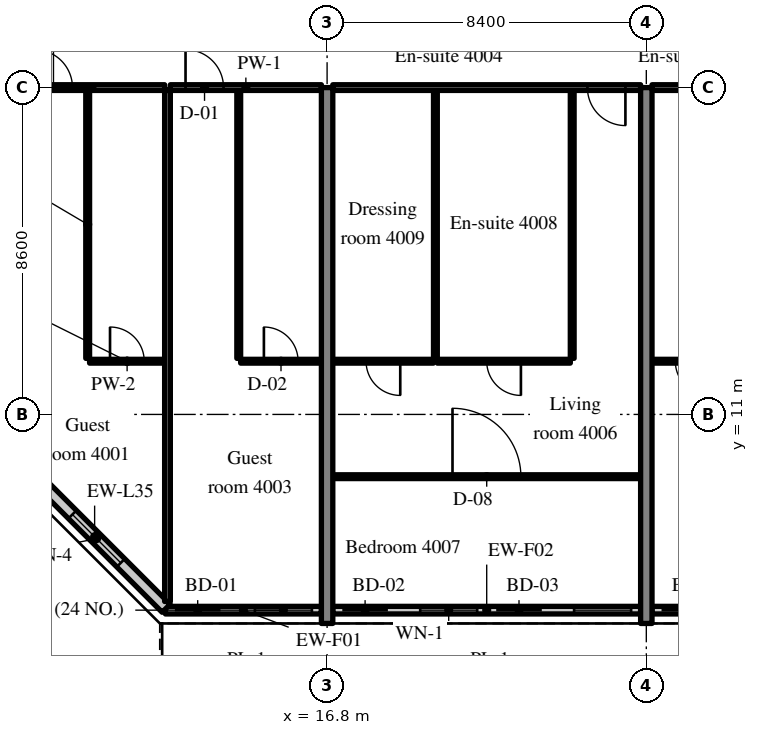
"""IFC4 building model, lengths in metres.
Left out: names, types, materials, properties, quantities, classifications, styles, units other than length and angle.
Written with IfcOpenShell. Run it as: python <this file> out.ifc"""

import sys

from ifc_helpers import new_model, si_unit, direction, frame, frame_2d, origin, place, context, subcontext, project, spatial, rectangle, extrude, source, transform, mapped, element, fill, save


model = new_model("IFC4")
c1 = context("Model", 3, precision=1e-05, world=origin(), true_north=direction((0.0, 1.0)))
c2 = subcontext(c1, "Body", "Model", "MODEL_VIEW")
j1 = project(units=[si_unit("LENGTHUNIT", "METRE"), si_unit("PLANEANGLEUNIT", "RADIAN")], contexts=[c1])
p1 = place(None, origin())
s1 = spatial("IfcSite", under=j1, at=p1, CompositionType="ELEMENT")
p2 = place(p1, origin())
s2 = spatial("IfcBuilding", under=s1, at=p2, CompositionType="ELEMENT")
p3 = place(p2, frame((0.0, 0.0, 166.8)))
s3 = spatial("IfcBuildingStorey", under=s2, at=p3, CompositionType="ELEMENT", Elevation=166.8)
m1 = source(origin(), c2, "Body", "SweptSolid", [
    extrude(rectangle(XDim=14.1, YDim=0.3, at=frame_2d((7.05, 0.0))), origin(), (0.0, 0.0, 1.0), 3.52),
])
for number, where, z_axis, x_axis in (
    (1, (16.8, 5.5, 0.0), (0.0, 0.0, 1.0), (0.0, 1.0, 0.0)),
    (2, (25.2, 5.5, 0.0), (0.0, 0.0, 1.0), (0.0, 1.0, 0.0)),
):
    element("IfcWall", number, at=place(p3, frame(where, z_axis=z_axis, x_axis=x_axis)), inside=s3, PredefinedType="SHEAR", context=c2, shape_type="MappedRepresentation", body=[
        mapped(m1, transform((0.0, 0.0, 0.0), scale=1.0)),
    ])
m2 = source(origin(), c2, "Body", "SweptSolid", [
    extrude(rectangle(XDim=4.105, YDim=0.2, at=frame_2d((2.052, 0.0))), origin(), (0.0, 0.0, 1.0), 2.87),
])
p4 = place(p3, frame((12.545, 5.85, 0.0), z_axis=(0.0, 0.0, 1.0), x_axis=(1.0, 0.0, 0.0)))
e3 = element("IfcWall", 3, at=p4, inside=s3, PredefinedType="SOLIDWALL", context=c2, shape_type="MappedRepresentation", body=[
    mapped(m2, transform((0.0, 0.0, 0.0), scale=1.0)),
])
m3 = source(origin(), c2, "Body", "SweptSolid", [
    extrude(rectangle(XDim=1.2, YDim=2.4, at=frame_2d((0.6, 1.2))), frame((0.0, 0.11, 0.0), z_axis=(0.0, -1.0, 0.0), x_axis=(1.0, 0.0, 0.0)), (0.0, 0.0, 1.0), 0.22),
])
p5 = place(p4, frame((0.25, 0.0, 0.0)))
e4 = element("IfcOpeningElement", 4, at=p5, cuts=e3, PredefinedType="OPENING", context=c2, shape_type="MappedRepresentation", body=[
    mapped(m3, transform((0.0, 0.0, 0.0), scale=1.0)),
])
m4 = source(origin(), c2, "Body", "SweptSolid", [
    extrude(rectangle(XDim=1.5, YDim=1.5, at=frame_2d((0.75, 0.75))), frame((0.0, 0.11, 0.0), z_axis=(0.0, -1.0, 0.0), x_axis=(1.0, 0.0, 0.0)), (0.0, 0.0, 1.0), 0.22),
])
p6 = place(p4, frame((2.355, 0.0, 0.9)))
e5 = element("IfcOpeningElement", 5, at=p6, cuts=e3, PredefinedType="OPENING", context=c2, shape_type="MappedRepresentation", body=[
    mapped(m4, transform((0.0, 0.0, 0.0), scale=1.0)),
])
m5 = source(origin(), c2, "Body", "SweptSolid", [
    extrude(rectangle(XDim=8.1, YDim=0.2, at=frame_2d((4.05, 0.0))), origin(), (0.0, 0.0, 1.0), 2.87),
])
p7 = place(p3, frame((16.95, 5.85, 0.0), z_axis=(0.0, 0.0, 1.0), x_axis=(1.0, 0.0, 0.0)))
e6 = element("IfcWall", 6, at=p7, inside=s3, PredefinedType="SOLIDWALL", context=c2, shape_type="MappedRepresentation", body=[
    mapped(m5, transform((0.0, 0.0, 0.0), scale=1.0)),
])
p8 = place(p7, frame((0.25, 0.0, 0.0)))
e7 = element("IfcOpeningElement", 7, at=p8, cuts=e6, PredefinedType="OPENING", context=c2, shape_type="MappedRepresentation", body=[
    mapped(m3, transform((0.0, 0.0, 0.0), scale=1.0)),
])
p9 = place(p7, frame((2.3, 0.0, 0.9)))
e8 = element("IfcOpeningElement", 8, at=p9, cuts=e6, PredefinedType="OPENING", context=c2, shape_type="MappedRepresentation", body=[
    mapped(m4, transform((0.0, 0.0, 0.0), scale=1.0)),
])
p10 = place(p7, frame((4.3, 0.0, 0.0)))
e9 = element("IfcOpeningElement", 9, at=p10, cuts=e6, PredefinedType="OPENING", context=c2, shape_type="MappedRepresentation", body=[
    mapped(m3, transform((0.0, 0.0, 0.0), scale=1.0)),
])
p11 = place(p7, frame((6.35, 0.0, 0.9)))
e10 = element("IfcOpeningElement", 10, at=p11, cuts=e6, PredefinedType="OPENING", context=c2, shape_type="MappedRepresentation", body=[
    mapped(m4, transform((0.0, 0.0, 0.0), scale=1.0)),
])
m6 = source(origin(), c2, "Body", "SweptSolid", [
    extrude(rectangle(XDim=8.1, YDim=0.2, at=frame_2d((4.05, 0.0))), origin(), (0.0, 0.0, 1.0), 2.87),
])
p12 = place(p3, frame((25.35, 5.85, 0.0), z_axis=(0.0, 0.0, 1.0), x_axis=(1.0, 0.0, 0.0)))
e11 = element("IfcWall", 11, at=p12, inside=s3, PredefinedType="SOLIDWALL", context=c2, shape_type="MappedRepresentation", body=[
    mapped(m6, transform((0.0, 0.0, 0.0), scale=1.0)),
])
p13 = place(p12, frame((0.25, 0.0, 0.0)))
e12 = element("IfcOpeningElement", 12, at=p13, cuts=e11, PredefinedType="OPENING", context=c2, shape_type="MappedRepresentation", body=[
    mapped(m3, transform((0.0, 0.0, 0.0), scale=1.0)),
])
p14 = place(p12, frame((2.3, 0.0, 0.9)))
e13 = element("IfcOpeningElement", 13, at=p14, cuts=e11, PredefinedType="OPENING", context=c2, shape_type="MappedRepresentation", body=[
    mapped(m4, transform((0.0, 0.0, 0.0), scale=1.0)),
])
p15 = place(p12, frame((4.3, 0.0, 0.0)))
e14 = element("IfcOpeningElement", 14, at=p15, cuts=e11, PredefinedType="OPENING", context=c2, shape_type="MappedRepresentation", body=[
    mapped(m3, transform((0.0, 0.0, 0.0), scale=1.0)),
])
p16 = place(p12, frame((6.35, 0.0, 0.9)))
e15 = element("IfcOpeningElement", 15, at=p16, cuts=e11, PredefinedType="OPENING", context=c2, shape_type="MappedRepresentation", body=[
    mapped(m4, transform((0.0, 0.0, 0.0), scale=1.0)),
])
m7 = source(origin(), c2, "Body", "SweptSolid", [
    extrude(rectangle(XDim=5.326, YDim=0.3, at=frame_2d((2.663, 0.0))), origin(), (0.0, 0.0, 1.0), 3.52),
])
p17 = place(p3, frame((8.8, 9.666, 0.0), z_axis=(0.0, 0.0, 1.0), x_axis=(0.707083859269, -0.707129702361, 0.0)))
e16 = element("IfcWall", 16, at=p17, inside=s3, PredefinedType="SOLIDWALL", context=c2, shape_type="MappedRepresentation", body=[
    mapped(m7, transform((0.0, 0.0, 0.0), scale=1.0)),
])
m8 = source(origin(), c2, "Body", "SweptSolid", [
    extrude(rectangle(XDim=1.8, YDim=1.5, at=frame_2d((0.9, 0.75))), frame((0.0, 0.16, 0.0), z_axis=(0.0, -1.0, 0.0), x_axis=(1.0, 0.0, 0.0)), (0.0, 0.0, 1.0), 0.32),
])
p18 = place(p17, frame((1.836, 0.0, 0.9)))
e17 = element("IfcOpeningElement", 17, at=p18, cuts=e16, PredefinedType="OPENING", context=c2, shape_type="MappedRepresentation", body=[
    mapped(m8, transform((0.0, 0.0, 0.0), scale=1.0)),
])
m9 = source(origin(), c2, "Body", "SweptSolid", [
    extrude(rectangle(XDim=7.05, YDim=0.1, at=frame_2d((3.525, 0.0))), origin(), (0.0, 0.0, 1.0), 3.52),
])
p19 = place(p3, frame((10.5, 12.475, 0.0), z_axis=(0.0, 0.0, 1.0), x_axis=(0.0, 1.0, 0.0)))
e18 = element("IfcWall", 18, at=p19, inside=s3, PredefinedType="PARTITIONING", context=c2, shape_type="MappedRepresentation", body=[
    mapped(m9, transform((0.0, 0.0, 0.0), scale=1.0)),
])
m10 = source(origin(), c2, "Body", "SweptSolid", [
    extrude(rectangle(XDim=1.975, YDim=0.1, at=frame_2d((0.987, 0.0))), origin(), (0.0, 0.0, 1.0), 3.52),
])
p20 = place(p3, frame((10.55, 12.4, 0.0), z_axis=(0.0, 0.0, 1.0), x_axis=(1.0, 0.0, 0.0)))
e19 = element("IfcWall", 19, at=p20, inside=s3, PredefinedType="PARTITIONING", context=c2, shape_type="MappedRepresentation", body=[
    mapped(m10, transform((0.0, 0.0, 0.0), scale=1.0)),
])
m11 = source(origin(), c2, "Body", "SweptSolid", [
    extrude(rectangle(XDim=0.9, YDim=2.1, at=frame_2d((0.45, 1.05))), frame((0.0, 0.06, 0.0), z_axis=(0.0, -1.0, 0.0), x_axis=(1.0, 0.0, 0.0)), (0.0, 0.0, 1.0), 0.12),
])
p21 = place(p20, frame((0.538, 0.0, 0.0)))
e20 = element("IfcOpeningElement", 20, at=p21, cuts=e19, PredefinedType="OPENING", context=c2, shape_type="MappedRepresentation", body=[
    mapped(m11, transform((0.0, 0.0, 0.0), scale=1.0)),
])
m12 = source(origin(), c2, "Body", "SweptSolid", [
    extrude(rectangle(XDim=3.825, YDim=0.15, at=frame_2d((1.913, 0.0))), origin(), (0.0, 0.0, 1.0), 2.82),
])
p22 = place(p3, frame((8.7, 19.6, 0.0), z_axis=(0.0, 0.0, 1.0), x_axis=(1.0, 0.0, 0.0)))
e21 = element("IfcWall", 21, at=p22, inside=s3, PredefinedType="PARTITIONING", context=c2, shape_type="MappedRepresentation", body=[
    mapped(m12, transform((0.0, 0.0, 0.0), scale=1.0)),
])
m13 = source(origin(), c2, "Body", "SweptSolid", [
    extrude(rectangle(XDim=1.0, YDim=2.1, at=frame_2d((0.5, 1.05))), frame((0.0, 0.085, 0.0), z_axis=(0.0, -1.0, 0.0), x_axis=(1.0, 0.0, 0.0)), (0.0, 0.0, 1.0), 0.17),
])
p23 = place(p22, frame((0.4, 0.0, 0.0)))
e22 = element("IfcOpeningElement", 22, at=p23, cuts=e21, PredefinedType="OPENING", context=c2, shape_type="MappedRepresentation", body=[
    mapped(m13, transform((0.0, 0.0, 0.0), scale=1.0)),
])
p24 = place(p3, frame((14.475, 12.475, 0.0), z_axis=(0.0, 0.0, 1.0), x_axis=(0.0, 1.0, 0.0)))
e23 = element("IfcWall", 23, at=p24, inside=s3, PredefinedType="PARTITIONING", context=c2, shape_type="MappedRepresentation", body=[
    mapped(m9, transform((0.0, 0.0, 0.0), scale=1.0)),
])
m14 = source(origin(), c2, "Body", "SweptSolid", [
    extrude(rectangle(XDim=2.125, YDim=0.1, at=frame_2d((1.062, 0.0))), origin(), (0.0, 0.0, 1.0), 3.52),
])
p25 = place(p3, frame((14.525, 12.4, 0.0), z_axis=(0.0, 0.0, 1.0), x_axis=(1.0, 0.0, 0.0)))
e24 = element("IfcWall", 24, at=p25, inside=s3, PredefinedType="PARTITIONING", context=c2, shape_type="MappedRepresentation", body=[
    mapped(m14, transform((0.0, 0.0, 0.0), scale=1.0)),
])
p26 = place(p25, frame((0.612, 0.0, 0.0)))
e25 = element("IfcOpeningElement", 25, at=p26, cuts=e24, PredefinedType="OPENING", context=c2, shape_type="MappedRepresentation", body=[
    mapped(m11, transform((0.0, 0.0, 0.0), scale=1.0)),
])
m15 = source(origin(), c2, "Body", "SweptSolid", [
    extrude(rectangle(XDim=3.975, YDim=0.15, at=frame_2d((1.987, 0.0))), origin(), (0.0, 0.0, 1.0), 2.82),
])
p27 = place(p3, frame((12.675, 19.6, 0.0), z_axis=(0.0, 0.0, 1.0), x_axis=(1.0, 0.0, 0.0)))
e26 = element("IfcWall", 26, at=p27, inside=s3, PredefinedType="PARTITIONING", context=c2, shape_type="MappedRepresentation", body=[
    mapped(m15, transform((0.0, 0.0, 0.0), scale=1.0)),
])
p28 = place(p27, frame((0.4, 0.0, 0.0)))
e27 = element("IfcOpeningElement", 27, at=p28, cuts=e26, PredefinedType="OPENING", context=c2, shape_type="MappedRepresentation", body=[
    mapped(m13, transform((0.0, 0.0, 0.0), scale=1.0)),
])
m16 = source(origin(), c2, "Body", "SweptSolid", [
    extrude(rectangle(XDim=13.447, YDim=0.15, at=frame_2d((6.724, 0.0))), origin(), (0.0, 0.0, 1.0), 3.52),
])
p29 = place(p3, frame((12.6, 6.078, 0.0), z_axis=(0.0, 0.0, 1.0), x_axis=(0.0, 1.0, 0.0)))
e28 = element("IfcWall", 28, at=p29, inside=s3, PredefinedType="PARTITIONING", context=c2, shape_type="MappedRepresentation", body=[
    mapped(m16, transform((0.0, 0.0, 0.0), scale=1.0)),
])
for number, where, z_axis, x_axis in (
    (29, (23.25, 12.475, 0.0), (0.0, 0.0, 1.0), (0.0, 1.0, 0.0)),
    (30, (19.65, 12.475, 0.0), (0.0, 0.0, 1.0), (0.0, 1.0, 0.0)),
):
    element("IfcWall", number, at=place(p3, frame(where, z_axis=z_axis, x_axis=x_axis)), inside=s3, PredefinedType="PARTITIONING", context=c2, shape_type="MappedRepresentation", body=[
        mapped(m9, transform((0.0, 0.0, 0.0), scale=1.0)),
    ])
m17 = source(origin(), c2, "Body", "SweptSolid", [
    extrude(rectangle(XDim=3.5, YDim=0.1, at=frame_2d((1.75, 0.0))), origin(), (0.0, 0.0, 1.0), 3.52),
])
p30 = place(p3, frame((19.7, 12.4, 0.0), z_axis=(0.0, 0.0, 1.0), x_axis=(1.0, 0.0, 0.0)))
e31 = element("IfcWall", 31, at=p30, inside=s3, PredefinedType="PARTITIONING", context=c2, shape_type="MappedRepresentation", body=[
    mapped(m17, transform((0.0, 0.0, 0.0), scale=1.0)),
])
p31 = place(p30, frame((1.3, 0.0, 0.0)))
e32 = element("IfcOpeningElement", 32, at=p31, cuts=e31, PredefinedType="OPENING", context=c2, shape_type="MappedRepresentation", body=[
    mapped(m11, transform((0.0, 0.0, 0.0), scale=1.0)),
])
m18 = source(origin(), c2, "Body", "SweptSolid", [
    extrude(rectangle(XDim=2.65, YDim=0.1, at=frame_2d((1.325, 0.0))), origin(), (0.0, 0.0, 1.0), 3.52),
])
p32 = place(p3, frame((16.95, 12.4, 0.0), z_axis=(0.0, 0.0, 1.0), x_axis=(1.0, 0.0, 0.0)))
e33 = element("IfcWall", 33, at=p32, inside=s3, PredefinedType="PARTITIONING", context=c2, shape_type="MappedRepresentation", body=[
    mapped(m18, transform((0.0, 0.0, 0.0), scale=1.0)),
])
p33 = place(p32, frame((0.875, 0.0, 0.0)))
e34 = element("IfcOpeningElement", 34, at=p33, cuts=e33, PredefinedType="OPENING", context=c2, shape_type="MappedRepresentation", body=[
    mapped(m11, transform((0.0, 0.0, 0.0), scale=1.0)),
])
m19 = source(origin(), c2, "Body", "SweptSolid", [
    extrude(rectangle(XDim=8.1, YDim=0.1, at=frame_2d((4.05, 0.0))), origin(), (0.0, 0.0, 1.0), 3.52),
])
p34 = place(p3, frame((16.95, 9.362, 0.0), z_axis=(0.0, 0.0, 1.0), x_axis=(1.0, 0.0, 0.0)))
e35 = element("IfcWall", 35, at=p34, inside=s3, PredefinedType="PARTITIONING", context=c2, shape_type="MappedRepresentation", body=[
    mapped(m19, transform((0.0, 0.0, 0.0), scale=1.0)),
])
m20 = source(origin(), c2, "Body", "SweptSolid", [
    extrude(rectangle(XDim=1.8, YDim=2.1, at=frame_2d((0.9, 1.05))), frame((0.0, 0.06, 0.0), z_axis=(0.0, -1.0, 0.0), x_axis=(1.0, 0.0, 0.0)), (0.0, 0.0, 1.0), 0.12),
])
p35 = place(p34, frame((3.15, 0.0, 0.0)))
e36 = element("IfcOpeningElement", 36, at=p35, cuts=e35, PredefinedType="OPENING", context=c2, shape_type="MappedRepresentation", body=[
    mapped(m20, transform((0.0, 0.0, 0.0), scale=1.0)),
])
m21 = source(origin(), c2, "Body", "SweptSolid", [
    extrude(rectangle(XDim=8.1, YDim=0.15, at=frame_2d((4.05, 0.0))), origin(), (0.0, 0.0, 1.0), 2.82),
])
p36 = place(p3, frame((16.95, 19.6, 0.0), z_axis=(0.0, 0.0, 1.0), x_axis=(1.0, 0.0, 0.0)))
e37 = element("IfcWall", 37, at=p36, inside=s3, PredefinedType="PARTITIONING", context=c2, shape_type="MappedRepresentation", body=[
    mapped(m21, transform((0.0, 0.0, 0.0), scale=1.0)),
])
p37 = place(p36, frame((6.7, 0.0, 0.0)))
e38 = element("IfcOpeningElement", 38, at=p37, cuts=e37, PredefinedType="OPENING", context=c2, shape_type="MappedRepresentation", body=[
    mapped(m13, transform((0.0, 0.0, 0.0), scale=1.0)),
])
p38 = place(p3, frame((25.35, 12.4, 0.0), z_axis=(0.0, 0.0, 1.0), x_axis=(1.0, 0.0, 0.0)))
e39 = element("IfcWall", 39, at=p38, inside=s3, PredefinedType="PARTITIONING", context=c2, shape_type="MappedRepresentation", body=[
    mapped(m14, transform((0.0, 0.0, 0.0), scale=1.0)),
])
p39 = place(p38, frame((0.613, 0.0, 0.0)))
e40 = element("IfcOpeningElement", 40, at=p39, cuts=e39, PredefinedType="OPENING", context=c2, shape_type="MappedRepresentation", body=[
    mapped(m11, transform((0.0, 0.0, 0.0), scale=1.0)),
])
p40 = place(p3, frame((25.35, 19.6, 0.0), z_axis=(0.0, 0.0, 1.0), x_axis=(1.0, 0.0, 0.0)))
e41 = element("IfcWall", 41, at=p40, inside=s3, PredefinedType="PARTITIONING", context=c2, shape_type="MappedRepresentation", body=[
    mapped(m15, transform((0.0, 0.0, 0.0), scale=1.0)),
])
p41 = place(p40, frame((2.575, 0.0, 0.0)))
e42 = element("IfcOpeningElement", 42, at=p41, cuts=e41, PredefinedType="OPENING", context=c2, shape_type="MappedRepresentation", body=[
    mapped(m13, transform((0.0, 0.0, 0.0), scale=1.0)),
])
m22 = source(origin(), c2, "Body", "SweptSolid", [
    extrude(rectangle(XDim=1.2, YDim=2.4, at=frame_2d((0.6, 1.2))), frame((0.0, 0.025, 0.0), z_axis=(0.0, -1.0, 0.0), x_axis=(1.0, 0.0, 0.0)), (0.0, 0.0, 1.0), 0.05),
])
p42 = place(p5, origin())
e43 = element("IfcDoor", 43, at=p42, inside=s3, OperationType="SLIDING_TO_LEFT", PredefinedType="DOOR", context=c2, shape_type="MappedRepresentation", body=[
    mapped(m22, transform((0.0, 0.0, 0.0), scale=1.0)),
])
fill(e4, e43)
m23 = source(origin(), c2, "Body", "SweptSolid", [
    extrude(rectangle(XDim=1.5, YDim=1.5, at=frame_2d((0.75, 0.75))), frame((0.0, 0.03, 0.0), z_axis=(0.0, -1.0, 0.0), x_axis=(1.0, 0.0, 0.0)), (0.0, 0.0, 1.0), 0.06),
])
p43 = place(p6, origin())
e44 = element("IfcWindow", 44, at=p43, inside=s3, PartitioningType="SINGLE_PANEL", PredefinedType="WINDOW", context=c2, shape_type="MappedRepresentation", body=[
    mapped(m23, transform((0.0, 0.0, 0.0), scale=1.0)),
])
fill(e5, e44)
p44 = place(p8, origin())
e45 = element("IfcDoor", 45, at=p44, inside=s3, OperationType="SLIDING_TO_RIGHT", PredefinedType="DOOR", context=c2, shape_type="MappedRepresentation", body=[
    mapped(m22, transform((0.0, 0.0, 0.0), scale=1.0)),
])
fill(e7, e45)
p45 = place(p9, origin())
e46 = element("IfcWindow", 46, at=p45, inside=s3, PartitioningType="SINGLE_PANEL", PredefinedType="WINDOW", context=c2, shape_type="MappedRepresentation", body=[
    mapped(m23, transform((0.0, 0.0, 0.0), scale=1.0)),
])
fill(e8, e46)
p46 = place(p10, origin())
e47 = element("IfcDoor", 47, at=p46, inside=s3, OperationType="SLIDING_TO_LEFT", PredefinedType="DOOR", context=c2, shape_type="MappedRepresentation", body=[
    mapped(m22, transform((0.0, 0.0, 0.0), scale=1.0)),
])
fill(e9, e47)
p47 = place(p11, origin())
e48 = element("IfcWindow", 48, at=p47, inside=s3, PartitioningType="SINGLE_PANEL", PredefinedType="WINDOW", context=c2, shape_type="MappedRepresentation", body=[
    mapped(m23, transform((0.0, 0.0, 0.0), scale=1.0)),
])
fill(e10, e48)
p48 = place(p13, origin())
e49 = element("IfcDoor", 49, at=p48, inside=s3, OperationType="SLIDING_TO_RIGHT", PredefinedType="DOOR", context=c2, shape_type="MappedRepresentation", body=[
    mapped(m22, transform((0.0, 0.0, 0.0), scale=1.0)),
])
fill(e12, e49)
m24 = source(origin(), c2, "Body", "SweptSolid", [
    extrude(rectangle(XDim=1.8, YDim=1.5, at=frame_2d((0.9, 0.75))), frame((0.0, 0.03, 0.0), z_axis=(0.0, -1.0, 0.0), x_axis=(1.0, 0.0, 0.0)), (0.0, 0.0, 1.0), 0.06),
])
p49 = place(p18, origin())
e50 = element("IfcWindow", 50, at=p49, inside=s3, PartitioningType="SINGLE_PANEL", PredefinedType="WINDOW", context=c2, shape_type="MappedRepresentation", body=[
    mapped(m24, transform((0.0, 0.0, 0.0), scale=1.0)),
])
fill(e17, e50)
m25 = source(origin(), c2, "Body", "SweptSolid", [
    extrude(rectangle(XDim=0.9, YDim=2.1, at=frame_2d((0.45, 1.05))), frame((0.0, 0.025, 0.0), z_axis=(0.0, -1.0, 0.0), x_axis=(1.0, 0.0, 0.0)), (0.0, 0.0, 1.0), 0.05),
])
p50 = place(p21, origin())
e51 = element("IfcDoor", 51, at=p50, inside=s3, OperationType="SINGLE_SWING_LEFT", PredefinedType="DOOR", context=c2, shape_type="MappedRepresentation", body=[
    mapped(m25, transform((0.0, 0.0, 0.0), scale=1.0)),
])
fill(e20, e51)
m26 = source(origin(), c2, "Body", "SweptSolid", [
    extrude(rectangle(XDim=1.0, YDim=2.1, at=frame_2d((0.5, 1.05))), frame((0.0, 0.025, 0.0), z_axis=(0.0, -1.0, 0.0), x_axis=(1.0, 0.0, 0.0)), (0.0, 0.0, 1.0), 0.05),
])
p51 = place(p23, origin())
e52 = element("IfcDoor", 52, at=p51, inside=s3, OperationType="SINGLE_SWING_LEFT", PredefinedType="DOOR", context=c2, shape_type="MappedRepresentation", body=[
    mapped(m26, transform((0.0, 0.0, 0.0), scale=1.0)),
])
fill(e22, e52)
p52 = place(p26, origin())
e53 = element("IfcDoor", 53, at=p52, inside=s3, OperationType="SINGLE_SWING_LEFT", PredefinedType="DOOR", context=c2, shape_type="MappedRepresentation", body=[
    mapped(m25, transform((0.0, 0.0, 0.0), scale=1.0)),
])
fill(e25, e53)
p53 = place(p28, origin())
e54 = element("IfcDoor", 54, at=p53, inside=s3, OperationType="SINGLE_SWING_LEFT", PredefinedType="DOOR", context=c2, shape_type="MappedRepresentation", body=[
    mapped(m26, transform((0.0, 0.0, 0.0), scale=1.0)),
])
fill(e27, e54)
p54 = place(p31, origin())
e55 = element("IfcDoor", 55, at=p54, inside=s3, OperationType="SINGLE_SWING_RIGHT", PredefinedType="DOOR", context=c2, shape_type="MappedRepresentation", body=[
    mapped(m25, transform((0.0, 0.0, 0.0), scale=1.0)),
])
fill(e32, e55)
p55 = place(p33, origin())
e56 = element("IfcDoor", 56, at=p55, inside=s3, OperationType="SINGLE_SWING_RIGHT", PredefinedType="DOOR", context=c2, shape_type="MappedRepresentation", body=[
    mapped(m25, transform((0.0, 0.0, 0.0), scale=1.0)),
])
fill(e34, e56)
m27 = source(origin(), c2, "Body", "SweptSolid", [
    extrude(rectangle(XDim=1.8, YDim=2.1, at=frame_2d((0.9, 1.05))), frame((0.0, 0.025, 0.0), z_axis=(0.0, -1.0, 0.0), x_axis=(1.0, 0.0, 0.0)), (0.0, 0.0, 1.0), 0.05),
])
p56 = place(p35, origin())
e57 = element("IfcDoor", 57, at=p56, inside=s3, OperationType="DOUBLE_DOOR_SINGLE_SWING", PredefinedType="DOOR", context=c2, shape_type="MappedRepresentation", body=[
    mapped(m27, transform((0.0, 0.0, 0.0), scale=1.0)),
])
fill(e36, e57)
p57 = place(p37, origin())
e58 = element("IfcDoor", 58, at=p57, inside=s3, OperationType="SINGLE_SWING_RIGHT", PredefinedType="DOOR", context=c2, shape_type="MappedRepresentation", body=[
    mapped(m26, transform((0.0, 0.0, 0.0), scale=1.0)),
])
fill(e38, e58)
p58 = place(p39, origin())
e59 = element("IfcDoor", 59, at=p58, inside=s3, OperationType="SINGLE_SWING_RIGHT", PredefinedType="DOOR", context=c2, shape_type="MappedRepresentation", body=[
    mapped(m25, transform((0.0, 0.0, 0.0), scale=1.0)),
])
fill(e40, e59)
save(model, sys.argv[1])
